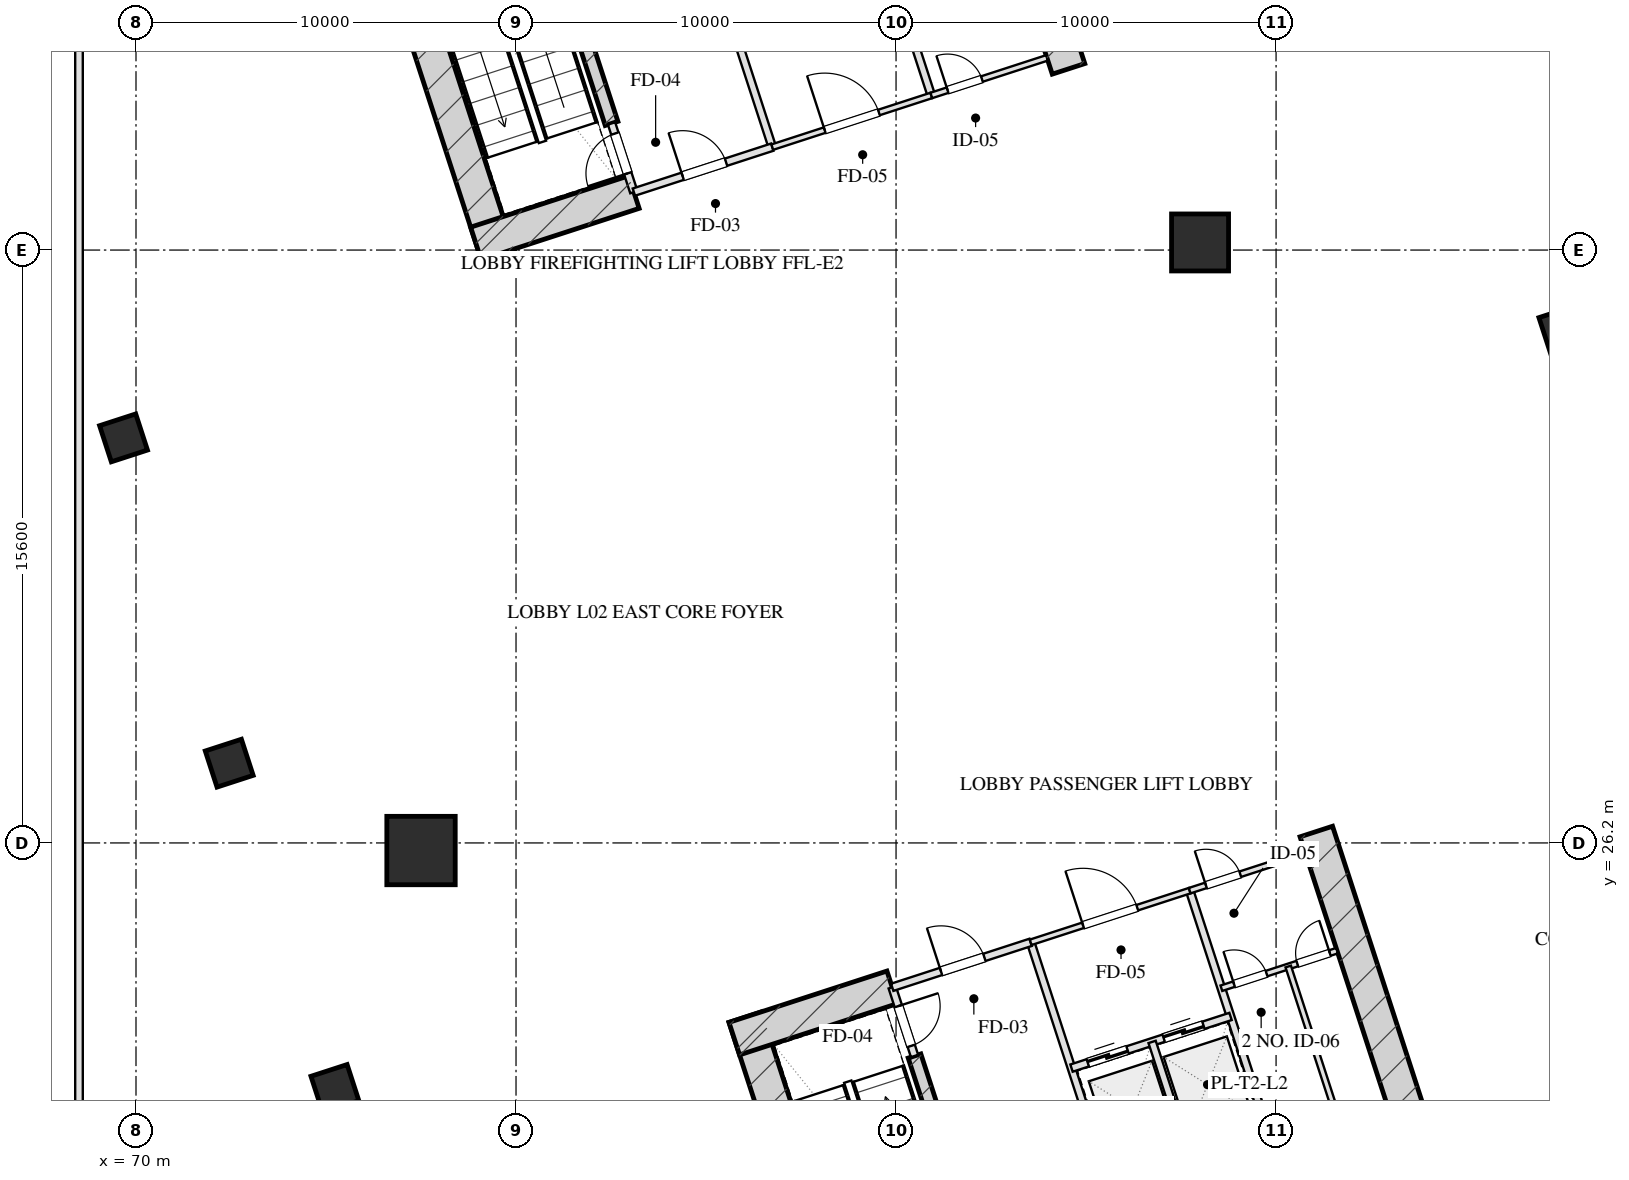
"""IFC4 building model, lengths in metres.
Left out: names, types, materials, properties, quantities, classifications, styles, units other than length and angle.
Written with IfcOpenShell. Run it as: python <this file> out.ifc"""

import sys

from ifc_helpers import new_model, si_unit, direction, frame, frame_2d, origin, origin_2d, place, context, subcontext, project, spatial, rectangle, hollow_rectangle, extrude, element, fill, save


model = new_model("IFC4")
c1 = context("Model", 3, precision=1e-05, world=origin(), true_north=direction((0.0, 1.0)))
c2 = subcontext(c1, "Body", "Model", "MODEL_VIEW")
j1 = project(units=[si_unit("LENGTHUNIT", "METRE"), si_unit("PLANEANGLEUNIT", "RADIAN")], contexts=[c1])
p1 = place(None, origin())
s1 = spatial("IfcSite", under=j1, at=p1, CompositionType="ELEMENT")
p2 = place(p1, origin())
s2 = spatial("IfcBuilding", under=s1, at=p2, CompositionType="ELEMENT")
p3 = place(p2, frame((0.0, 0.0, 11.5)))
s3 = spatial("IfcBuildingStorey", under=s2, at=p3, CompositionType="ELEMENT", Elevation=11.5)
p4 = place(p3, frame((86.032, 21.618, 0.0), z_axis=(0.0, 0.0, 1.0), x_axis=(0.30901438634, -0.951057363693, 0.0)))
e1 = element("IfcWall", 1, at=p4, inside=s3, PredefinedType="SHEAR", context=c2, shape_type="SweptSolid", body=[
    extrude(rectangle(XDim=9.78, YDim=0.9, at=frame_2d((4.89, 0.0))), origin(), (0.0, 0.0, 1.0), 5.0),
])
p5 = place(p3, frame((101.059, 26.5, 0.0), z_axis=(0.0, 0.0, 1.0), x_axis=(0.309021722829, -0.951054979914, 0.0)))
e2 = element("IfcWall", 2, at=p5, inside=s3, PredefinedType="SHEAR", context=c2, shape_type="SweptSolid", body=[
    extrude(rectangle(XDim=9.78, YDim=0.9, at=frame_2d((4.89, 0.0))), origin(), (0.0, 0.0, 1.0), 5.0),
])
p6 = place(p3, frame((90.486, 20.594, 0.0), z_axis=(0.0, 0.0, 1.0), x_axis=(0.309020428229, -0.951055400562, 0.0)))
e3 = element("IfcWall", 3, at=p6, inside=s3, PredefinedType="SHEAR", context=c2, shape_type="SweptSolid", body=[
    extrude(rectangle(XDim=6.98, YDim=0.35, at=frame_2d((3.49, 0.0))), origin(), (0.0, 0.0, 1.0), 5.0),
])
p7 = place(p3, frame((85.743, 21.051, 0.0), z_axis=(0.0, 0.0, 1.0), x_axis=(0.951063623806, 0.308995118848, 0.0)))
e4 = element("IfcWall", 4, at=p7, inside=s3, PredefinedType="SHEAR", context=c2, shape_type="SweptSolid", body=[
    extrude(rectangle(XDim=4.37, YDim=0.9, at=frame_2d((2.185, 0.0))), origin(), (0.0, 0.0, 1.0), 5.0),
])
for number, where, z_axis, x_axis in (
    (5, (79.512, 41.685, 0.0), (0.0, 0.0, 1.0), (-0.309, 0.951, 0.0)),
    (6, (94.539, 46.568, 0.0), (0.0, 0.0, 1.0), (-0.309, 0.951, 0.0)),
):
    element("IfcWall", number, at=place(p3, frame(where, z_axis=z_axis, x_axis=x_axis)), inside=s3, PredefinedType="SHEAR", context=c2, shape_type="SweptSolid", body=[
        extrude(rectangle(XDim=9.78, YDim=0.9, at=frame_2d((4.89, 0.0))), origin(), (0.0, 0.0, 1.0), 5.0),
    ])
p8 = place(p3, frame((82.514, 45.131, 0.0), z_axis=(0.0, 0.0, 1.0), x_axis=(-0.308988790936, 0.951065679686, 0.0)))
e7 = element("IfcWall", 7, at=p8, inside=s3, PredefinedType="SHEAR", context=c2, shape_type="SweptSolid", body=[
    extrude(rectangle(XDim=6.98, YDim=0.35, at=frame_2d((3.49, 0.0))), origin(), (0.0, 0.0, 1.0), 5.0),
])
p9 = place(p3, frame((78.945, 41.974, 0.0), z_axis=(0.0, 0.0, 1.0), x_axis=(0.951058289404, 0.309011537255, 0.0)))
e8 = element("IfcWall", 8, at=p9, inside=s3, PredefinedType="SHEAR", context=c2, shape_type="SweptSolid", body=[
    extrude(rectangle(XDim=4.37, YDim=0.9, at=frame_2d((2.185, 0.0))), origin(), (0.0, 0.0, 1.0), 5.0),
])
p10 = place(p3, frame((77.5, 26.0, 0.0), z_axis=(0.0, 0.0, 1.0), x_axis=(1.0, 0.0, 0.0)))
e9 = element("IfcColumn", 9, at=p10, inside=s3, PredefinedType="COLUMN", context=c2, shape_type="SweptSolid", body=[
    extrude(hollow_rectangle(XDim=1.8, YDim=1.8, WallThickness=0.06, at=origin_2d()), origin(), (0.0, 0.0, 1.0), 5.001),
])
p11 = place(p3, frame((98.0, 42.0, 0.0), z_axis=(0.0, 0.0, 1.0), x_axis=(1.0, 0.0, 0.0)))
e10 = element("IfcColumn", 10, at=p11, inside=s3, PredefinedType="COLUMN", context=c2, shape_type="SweptSolid", body=[
    extrude(rectangle(XDim=1.5, YDim=1.5, at=origin_2d()), origin(), (0.0, 0.0, 1.0), 5.001),
])
for number, where, z_axis, x_axis in (
    (11, (75.234, 19.739, 0.0), (0.0, 0.0, 1.0), (0.951, 0.309, 0.0)),
    (12, (72.453, 28.299, 0.0), (0.0, 0.0, 1.0), (0.951, 0.309, 0.0)),
    (13, (69.672, 36.858, 0.0), (0.0, 0.0, 1.0), (0.951, 0.309, 0.0)),
    (14, (107.547, 39.701, 0.0), (0.0, 0.0, 1.0), (0.951, 0.309, 0.0)),
):
    element("IfcColumn", number, at=place(p3, frame(where, z_axis=z_axis, x_axis=x_axis)), inside=s3, PredefinedType="COLUMN", context=c2, shape_type="SweptSolid", body=[
        extrude(hollow_rectangle(XDim=1.0, YDim=1.0, WallThickness=0.036, at=origin_2d()), origin(), (0.0, 0.0, 1.0), 5.001),
    ])
p12 = place(p3, frame((89.899, 22.401, 0.0), z_axis=(0.0, 0.0, 1.0), x_axis=(0.308932062672, -0.951084108086, 0.0)))
e15 = element("IfcWall", 15, at=p12, inside=s3, PredefinedType="PARTITIONING", context=c2, shape_type="SweptSolid", body=[
    extrude(rectangle(XDim=1.9, YDim=0.2, at=frame_2d((0.95, 0.0))), origin(), (0.0, 0.0, 1.0), 4.685),
])
p13 = place(p12, frame((0.52, 0.0, 0.0)))
e16 = element("IfcOpeningElement", 16, at=p13, cuts=e15, PredefinedType="OPENING", context=c2, shape_type="SweptSolid", body=[
    extrude(rectangle(XDim=1.1, YDim=2.05, at=frame_2d((0.55, 1.025))), frame((0.0, 0.11, 0.0), z_axis=(0.0, -1.0, 0.0), x_axis=(1.0, 0.0, 0.0)), (0.0, 0.0, 1.0), 0.22),
])
p14 = place(p3, frame((93.542, 23.585, 0.0), z_axis=(0.0, 0.0, 1.0), x_axis=(0.309042196757, -0.951048327176, 0.0)))
e17 = element("IfcWall", 17, at=p14, inside=s3, PredefinedType="PARTITIONING", context=c2, shape_type="SweptSolid", body=[
    extrude(rectangle(XDim=8.43, YDim=0.2, at=frame_2d((4.215, 0.0))), origin(), (0.0, 0.0, 1.0), 4.685),
])
p15 = place(p3, frame((89.899, 22.401, 0.0), z_axis=(0.0, 0.0, 1.0), x_axis=(0.951046716504, 0.309047153403, 0.0)))
e18 = element("IfcWall", 18, at=p15, inside=s3, PredefinedType="PARTITIONING", context=c2, shape_type="SweptSolid", body=[
    extrude(rectangle(XDim=3.83, YDim=0.2, at=frame_2d((1.915, 0.0))), origin(), (0.0, 0.0, 1.0), 4.685),
])
p16 = place(p15, frame((1.35, 0.0, 0.0)))
e19 = element("IfcOpeningElement", 19, at=p16, cuts=e18, PredefinedType="OPENING", context=c2, shape_type="SweptSolid", body=[
    extrude(rectangle(XDim=1.2, YDim=2.05, at=frame_2d((0.6, 1.025))), frame((0.0, 0.11, 0.0), z_axis=(0.0, -1.0, 0.0), x_axis=(1.0, 0.0, 0.0)), (0.0, 0.0, 1.0), 0.22),
])
p17 = place(p3, frame((97.727, 24.944, 0.0), z_axis=(0.0, 0.0, 1.0), x_axis=(0.309016001439, -0.951056838919, 0.0)))
e20 = element("IfcWall", 20, at=p17, inside=s3, PredefinedType="PARTITIONING", context=c2, shape_type="SweptSolid", body=[
    extrude(rectangle(XDim=8.43, YDim=0.2, at=frame_2d((4.215, 0.0))), origin(), (0.0, 0.0, 1.0), 4.685),
])
p18 = place(p3, frame((93.542, 23.585, 0.0), z_axis=(0.0, 0.0, 1.0), x_axis=(0.951063829732, 0.308994485023, 0.0)))
e21 = element("IfcWall", 21, at=p18, inside=s3, PredefinedType="PARTITIONING", context=c2, shape_type="SweptSolid", body=[
    extrude(rectangle(XDim=4.4, YDim=0.15, at=frame_2d((2.2, 0.0))), origin(), (0.0, 0.0, 1.0), 4.685),
])
p19 = place(p18, frame((1.45, 0.0, 0.0)))
e22 = element("IfcOpeningElement", 22, at=p19, cuts=e21, PredefinedType="OPENING", context=c2, shape_type="SweptSolid", body=[
    extrude(rectangle(XDim=1.5, YDim=2.05, at=frame_2d((0.75, 1.025))), frame((0.0, 0.085, 0.0), z_axis=(0.0, -1.0, 0.0), x_axis=(1.0, 0.0, 0.0)), (0.0, 0.0, 1.0), 0.17),
])
p20 = place(p3, frame((94.617, 20.275, 0.0), z_axis=(0.0, 0.0, 1.0), x_axis=(0.951058531764, 0.30901079133, 0.0)))
e23 = element("IfcWall", 23, at=p20, inside=s3, PredefinedType="PARTITIONING", context=c2, shape_type="SweptSolid", body=[
    extrude(rectangle(XDim=4.4, YDim=0.2, at=frame_2d((2.2, 0.0))), origin(), (0.0, 0.0, 1.0), 4.685),
])
p21 = place(p20, frame((0.45, 0.0, 0.0)))
e24 = element("IfcOpeningElement", 24, at=p21, cuts=e23, PredefinedType="OPENING", context=c2, shape_type="SweptSolid", body=[
    extrude(rectangle(XDim=1.1, YDim=2.05, at=frame_2d((0.55, 1.025))), frame((0.0, 0.11, 0.0), z_axis=(0.0, -1.0, 0.0), x_axis=(1.0, 0.0, 0.0)), (0.0, 0.0, 1.0), 0.22),
])
p22 = place(p20, frame((2.55, 0.0, 0.0)))
e25 = element("IfcOpeningElement", 25, at=p22, cuts=e23, PredefinedType="OPENING", context=c2, shape_type="SweptSolid", body=[
    extrude(rectangle(XDim=1.1, YDim=2.05, at=frame_2d((0.55, 1.025))), frame((0.0, 0.11, 0.0), z_axis=(0.0, -1.0, 0.0), x_axis=(1.0, 0.0, 0.0)), (0.0, 0.0, 1.0), 0.22),
])
p23 = place(p3, frame((96.738, 20.964, 0.0), z_axis=(0.0, 0.0, 1.0), x_axis=(0.309042578481, -0.951048203135, 0.0)))
e26 = element("IfcWall", 26, at=p23, inside=s3, PredefinedType="PARTITIONING", context=c2, shape_type="SweptSolid", body=[
    extrude(rectangle(XDim=4.95, YDim=0.2, at=frame_2d((2.475, 0.0))), origin(), (0.0, 0.0, 1.0), 4.685),
])
p24 = place(p3, frame((97.727, 24.944, 0.0), z_axis=(0.0, 0.0, 1.0), x_axis=(0.951036872128, 0.309077446369, 0.0)))
e27 = element("IfcWall", 27, at=p24, inside=s3, PredefinedType="PARTITIONING", context=c2, shape_type="SweptSolid", body=[
    extrude(rectangle(XDim=3.2, YDim=0.15, at=frame_2d((1.6, 0.0))), origin(), (0.0, 0.0, 1.0), 4.685),
])
p25 = place(p24, frame((0.45, 0.0, 0.0)))
e28 = element("IfcOpeningElement", 28, at=p25, cuts=e27, PredefinedType="OPENING", context=c2, shape_type="SweptSolid", body=[
    extrude(rectangle(XDim=0.95, YDim=2.05, at=frame_2d((0.475, 1.025))), frame((0.0, 0.085, 0.0), z_axis=(0.0, -1.0, 0.0), x_axis=(1.0, 0.0, 0.0)), (0.0, 0.0, 1.0), 0.17),
])
p26 = place(p3, frame((98.561, 22.376, 0.0), z_axis=(0.0, 0.0, 1.0), x_axis=(0.95104415986, 0.309055020985, 0.0)))
e29 = element("IfcWall", 29, at=p26, inside=s3, PredefinedType="PARTITIONING", context=c2, shape_type="SweptSolid", body=[
    extrude(rectangle(XDim=3.2, YDim=0.15, at=frame_2d((1.6, 0.0))), origin(), (0.0, 0.0, 1.0), 4.685),
])
p27 = place(p26, frame((0.35, 0.0, 0.0)))
e30 = element("IfcOpeningElement", 30, at=p27, cuts=e29, PredefinedType="OPENING", context=c2, shape_type="SweptSolid", body=[
    extrude(rectangle(XDim=0.9, YDim=2.05, at=frame_2d((0.45, 1.025))), frame((0.0, 0.085, 0.0), z_axis=(0.0, -1.0, 0.0), x_axis=(1.0, 0.0, 0.0)), (0.0, 0.0, 1.0), 0.17),
])
p28 = place(p26, frame((2.1, 0.0, 0.0)))
e31 = element("IfcOpeningElement", 31, at=p28, cuts=e29, PredefinedType="OPENING", context=c2, shape_type="SweptSolid", body=[
    extrude(rectangle(XDim=0.9, YDim=2.05, at=frame_2d((0.45, 1.025))), frame((0.0, 0.085, 0.0), z_axis=(0.0, -1.0, 0.0), x_axis=(1.0, 0.0, 0.0)), (0.0, 0.0, 1.0), 0.17),
])
p29 = place(p3, frame((100.32, 22.948, 0.0), z_axis=(0.0, 0.0, 1.0), x_axis=(0.309035009867, -0.951050662518, 0.0)))
e32 = element("IfcWall", 32, at=p29, inside=s3, PredefinedType="PARTITIONING", context=c2, shape_type="SweptSolid", body=[
    extrude(rectangle(XDim=5.73, YDim=0.15, at=frame_2d((2.865, 0.0))), origin(), (0.0, 0.0, 1.0), 4.685),
])
p30 = place(p3, frame((83.101, 43.324, 0.0), z_axis=(0.0, 0.0, 1.0), x_axis=(-0.309048298632, 0.951046344356, 0.0)))
e33 = element("IfcWall", 33, at=p30, inside=s3, PredefinedType="PARTITIONING", context=c2, shape_type="SweptSolid", body=[
    extrude(rectangle(XDim=1.9, YDim=0.2, at=frame_2d((0.95, 0.0))), origin(), (0.0, 0.0, 1.0), 4.685),
])
p31 = place(p30, frame((0.52, 0.0, 0.0)))
e34 = element("IfcOpeningElement", 34, at=p31, cuts=e33, PredefinedType="OPENING", context=c2, shape_type="SweptSolid", body=[
    extrude(rectangle(XDim=1.1, YDim=2.05, at=frame_2d((0.55, 1.025))), frame((0.0, 0.11, 0.0), z_axis=(0.0, -1.0, 0.0), x_axis=(1.0, 0.0, 0.0)), (0.0, 0.0, 1.0), 0.22),
])
p32 = place(p3, frame((86.743, 44.508, 0.0), z_axis=(0.0, 0.0, 1.0), x_axis=(-0.309016001439, 0.951056838919, 0.0)))
e35 = element("IfcWall", 35, at=p32, inside=s3, PredefinedType="PARTITIONING", context=c2, shape_type="SweptSolid", body=[
    extrude(rectangle(XDim=8.43, YDim=0.2, at=frame_2d((4.215, 0.0))), origin(), (0.0, 0.0, 1.0), 4.685),
])
p33 = place(p3, frame((83.101, 43.324, 0.0), z_axis=(0.0, 0.0, 1.0), x_axis=(0.951052804469, 0.309028417967, 0.0)))
e36 = element("IfcWall", 36, at=p33, inside=s3, PredefinedType="PARTITIONING", context=c2, shape_type="SweptSolid", body=[
    extrude(rectangle(XDim=3.83, YDim=0.2, at=frame_2d((1.915, 0.0))), origin(), (0.0, 0.0, 1.0), 4.685),
])
p34 = place(p33, frame((1.35, 0.0, 0.0)))
e37 = element("IfcOpeningElement", 37, at=p34, cuts=e36, PredefinedType="OPENING", context=c2, shape_type="SweptSolid", body=[
    extrude(rectangle(XDim=1.2, YDim=2.05, at=frame_2d((0.6, 1.025))), frame((0.0, 0.11, 0.0), z_axis=(0.0, -1.0, 0.0), x_axis=(1.0, 0.0, 0.0)), (0.0, 0.0, 1.0), 0.22),
])
p35 = place(p3, frame((90.928, 45.868, 0.0), z_axis=(0.0, 0.0, 1.0), x_axis=(-0.309042196757, 0.951048327176, 0.0)))
e38 = element("IfcWall", 38, at=p35, inside=s3, PredefinedType="PARTITIONING", context=c2, shape_type="SweptSolid", body=[
    extrude(rectangle(XDim=8.43, YDim=0.2, at=frame_2d((4.215, 0.0))), origin(), (0.0, 0.0, 1.0), 4.685),
])
p36 = place(p3, frame((86.743, 44.508, 0.0), z_axis=(0.0, 0.0, 1.0), x_axis=(0.951063829732, 0.308994485023, 0.0)))
e39 = element("IfcWall", 39, at=p36, inside=s3, PredefinedType="PARTITIONING", context=c2, shape_type="SweptSolid", body=[
    extrude(rectangle(XDim=4.4, YDim=0.15, at=frame_2d((2.2, 0.0))), origin(), (0.0, 0.0, 1.0), 4.685),
])
p37 = place(p36, frame((1.45, 0.0, 0.0)))
e40 = element("IfcOpeningElement", 40, at=p37, cuts=e39, PredefinedType="OPENING", context=c2, shape_type="SweptSolid", body=[
    extrude(rectangle(XDim=1.5, YDim=2.05, at=frame_2d((0.75, 1.025))), frame((0.0, 0.085, 0.0), z_axis=(0.0, -1.0, 0.0), x_axis=(1.0, 0.0, 0.0)), (0.0, 0.0, 1.0), 0.17),
])
p38 = place(p3, frame((90.928, 45.868, 0.0), z_axis=(0.0, 0.0, 1.0), x_axis=(0.951059297078, 0.309008435874, 0.0)))
e41 = element("IfcWall", 41, at=p38, inside=s3, PredefinedType="PARTITIONING", context=c2, shape_type="SweptSolid", body=[
    extrude(rectangle(XDim=3.2, YDim=0.15, at=frame_2d((1.6, 0.0))), origin(), (0.0, 0.0, 1.0), 4.685),
])
p39 = place(p38, frame((0.45, 0.0, 0.0)))
e42 = element("IfcOpeningElement", 42, at=p39, cuts=e41, PredefinedType="OPENING", context=c2, shape_type="SweptSolid", body=[
    extrude(rectangle(XDim=0.95, YDim=2.05, at=frame_2d((0.475, 1.025))), frame((0.0, 0.085, 0.0), z_axis=(0.0, -1.0, 0.0), x_axis=(1.0, 0.0, 0.0)), (0.0, 0.0, 1.0), 0.17),
])
p40 = place(p3, frame((68.5, 18.9, 0.0), z_axis=(0.0, 0.0, 1.0), x_axis=(0.0, 1.0, 0.0)))
e43 = element("IfcWall", 43, at=p40, inside=s3, PredefinedType="PARTITIONING", context=c2, shape_type="SweptSolid", body=[
    extrude(rectangle(XDim=30.2, YDim=0.2, at=frame_2d((15.1, 0.0))), origin(), (0.0, 0.0, 1.0), 4.685),
])
p41 = place(p13, origin())
e44 = element("IfcDoor", 44, at=p41, inside=s3, OperationType="SINGLE_SWING_LEFT", PredefinedType="DOOR", context=c2, shape_type="SweptSolid", body=[
    extrude(rectangle(XDim=1.1, YDim=2.05, at=frame_2d((0.55, 1.025))), frame((0.0, 0.025, 0.0), z_axis=(0.0, -1.0, 0.0), x_axis=(1.0, 0.0, 0.0)), (0.0, 0.0, 1.0), 0.05),
])
fill(e16, e44)
p42 = place(p16, origin())
e45 = element("IfcDoor", 45, at=p42, inside=s3, OperationType="SINGLE_SWING_LEFT", PredefinedType="DOOR", context=c2, shape_type="SweptSolid", body=[
    extrude(rectangle(XDim=1.2, YDim=2.05, at=frame_2d((0.6, 1.025))), frame((0.0, 0.025, 0.0), z_axis=(0.0, -1.0, 0.0), x_axis=(1.0, 0.0, 0.0)), (0.0, 0.0, 1.0), 0.05),
])
fill(e19, e45)
p43 = place(p19, origin())
e46 = element("IfcDoor", 46, at=p43, inside=s3, OperationType="SINGLE_SWING_LEFT", PredefinedType="DOOR", context=c2, shape_type="SweptSolid", body=[
    extrude(rectangle(XDim=1.5, YDim=2.05, at=frame_2d((0.75, 1.025))), frame((0.0, 0.025, 0.0), z_axis=(0.0, -1.0, 0.0), x_axis=(1.0, 0.0, 0.0)), (0.0, 0.0, 1.0), 0.05),
])
fill(e22, e46)
p44 = place(p21, origin())
e47 = element("IfcDoor", 47, at=p44, inside=s3, OperationType="DOUBLE_DOOR_SLIDING", PredefinedType="DOOR", context=c2, shape_type="SweptSolid", body=[
    extrude(rectangle(XDim=1.1, YDim=2.05, at=frame_2d((0.55, 1.025))), frame((0.0, 0.025, 0.0), z_axis=(0.0, -1.0, 0.0), x_axis=(1.0, 0.0, 0.0)), (0.0, 0.0, 1.0), 0.05),
])
fill(e24, e47)
p45 = place(p22, origin())
e48 = element("IfcDoor", 48, at=p45, inside=s3, OperationType="DOUBLE_DOOR_SLIDING", PredefinedType="DOOR", context=c2, shape_type="SweptSolid", body=[
    extrude(rectangle(XDim=1.1, YDim=2.05, at=frame_2d((0.55, 1.025))), frame((0.0, 0.025, 0.0), z_axis=(0.0, -1.0, 0.0), x_axis=(1.0, 0.0, 0.0)), (0.0, 0.0, 1.0), 0.05),
])
fill(e25, e48)
p46 = place(p25, origin())
e49 = element("IfcDoor", 49, at=p46, inside=s3, OperationType="SINGLE_SWING_LEFT", PredefinedType="DOOR", context=c2, shape_type="SweptSolid", body=[
    extrude(rectangle(XDim=0.95, YDim=2.05, at=frame_2d((0.475, 1.025))), frame((0.0, 0.025, 0.0), z_axis=(0.0, -1.0, 0.0), x_axis=(1.0, 0.0, 0.0)), (0.0, 0.0, 1.0), 0.05),
])
fill(e28, e49)
p47 = place(p27, origin())
e50 = element("IfcDoor", 50, at=p47, inside=s3, OperationType="SINGLE_SWING_LEFT", PredefinedType="DOOR", context=c2, shape_type="SweptSolid", body=[
    extrude(rectangle(XDim=0.9, YDim=2.05, at=frame_2d((0.45, 1.025))), frame((0.0, 0.025, 0.0), z_axis=(0.0, -1.0, 0.0), x_axis=(1.0, 0.0, 0.0)), (0.0, 0.0, 1.0), 0.05),
])
fill(e30, e50)
p48 = place(p28, origin())
e51 = element("IfcDoor", 51, at=p48, inside=s3, OperationType="SINGLE_SWING_RIGHT", PredefinedType="DOOR", context=c2, shape_type="SweptSolid", body=[
    extrude(rectangle(XDim=0.9, YDim=2.05, at=frame_2d((0.45, 1.025))), frame((0.0, 0.025, 0.0), z_axis=(0.0, -1.0, 0.0), x_axis=(1.0, 0.0, 0.0)), (0.0, 0.0, 1.0), 0.05),
])
fill(e31, e51)
p49 = place(p31, origin())
e52 = element("IfcDoor", 52, at=p49, inside=s3, OperationType="SINGLE_SWING_LEFT", PredefinedType="DOOR", context=c2, shape_type="SweptSolid", body=[
    extrude(rectangle(XDim=1.1, YDim=2.05, at=frame_2d((0.55, 1.025))), frame((0.0, 0.025, 0.0), z_axis=(0.0, -1.0, 0.0), x_axis=(1.0, 0.0, 0.0)), (0.0, 0.0, 1.0), 0.05),
])
fill(e34, e52)
p50 = place(p34, origin())
e53 = element("IfcDoor", 53, at=p50, inside=s3, OperationType="SINGLE_SWING_LEFT", PredefinedType="DOOR", context=c2, shape_type="SweptSolid", body=[
    extrude(rectangle(XDim=1.2, YDim=2.05, at=frame_2d((0.6, 1.025))), frame((0.0, 0.025, 0.0), z_axis=(0.0, -1.0, 0.0), x_axis=(1.0, 0.0, 0.0)), (0.0, 0.0, 1.0), 0.05),
])
fill(e37, e53)
p51 = place(p37, origin())
e54 = element("IfcDoor", 54, at=p51, inside=s3, OperationType="SINGLE_SWING_LEFT", PredefinedType="DOOR", context=c2, shape_type="SweptSolid", body=[
    extrude(rectangle(XDim=1.5, YDim=2.05, at=frame_2d((0.75, 1.025))), frame((0.0, 0.025, 0.0), z_axis=(0.0, -1.0, 0.0), x_axis=(1.0, 0.0, 0.0)), (0.0, 0.0, 1.0), 0.05),
])
fill(e40, e54)
p52 = place(p39, origin())
e55 = element("IfcDoor", 55, at=p52, inside=s3, OperationType="SINGLE_SWING_LEFT", PredefinedType="DOOR", context=c2, shape_type="SweptSolid", body=[
    extrude(rectangle(XDim=0.95, YDim=2.05, at=frame_2d((0.475, 1.025))), frame((0.0, 0.025, 0.0), z_axis=(0.0, -1.0, 0.0), x_axis=(1.0, 0.0, 0.0)), (0.0, 0.0, 1.0), 0.05),
])
fill(e42, e55)
save(model, sys.argv[1])
